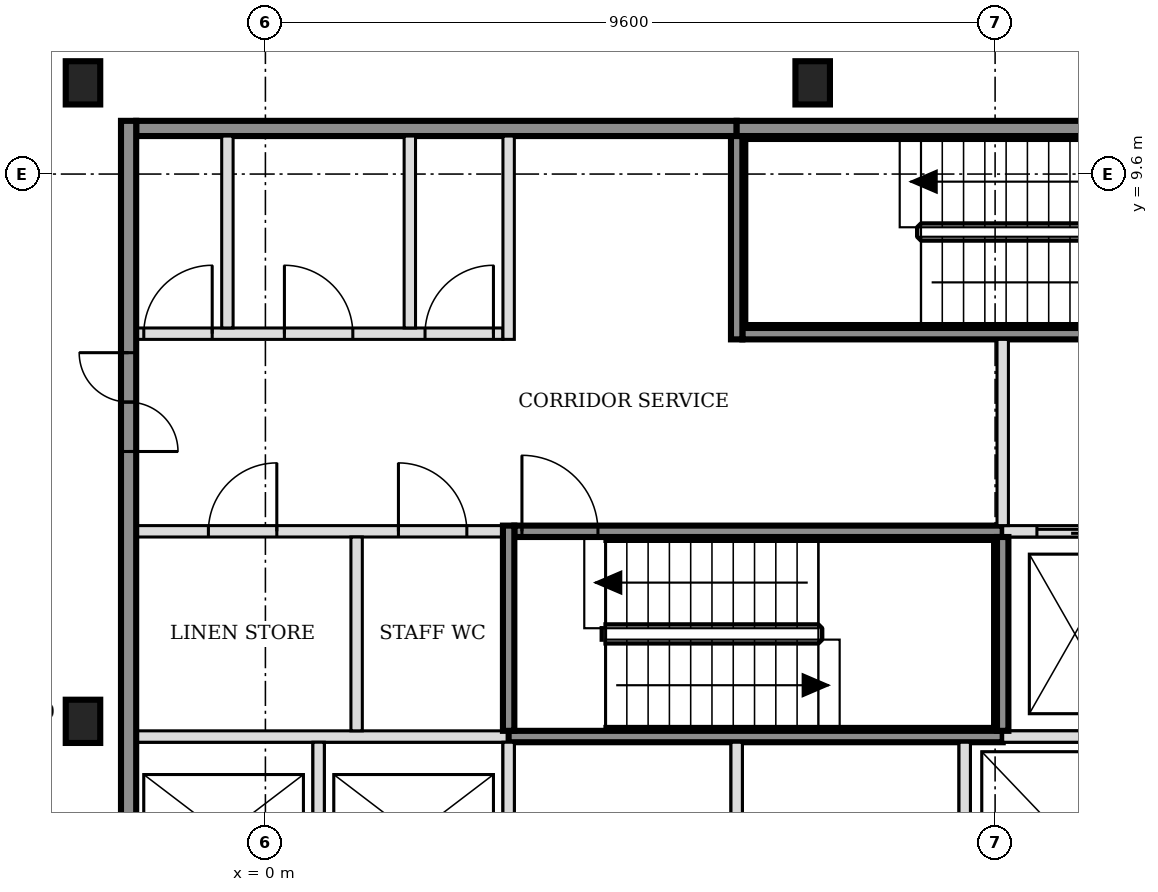
"""IFC4 building model, lengths in metres.
Left out: names, types, materials, properties, quantities, classifications, styles, units other than length and angle.
Written with IfcOpenShell. Run it as: python <this file> out.ifc"""

import sys

from ifc_helpers import new_model, si_unit, direction, frame, frame_2d, origin, origin_2d, place, context, subcontext, project, spatial, rectangle, i_section, extrude, element, fill, save


model = new_model("IFC4")
c1 = context("Model", 3, precision=1e-05, world=origin(), true_north=direction((0.0, 1.0)))
c2 = subcontext(c1, "Body", "Model", "MODEL_VIEW")
j1 = project(units=[si_unit("LENGTHUNIT", "METRE"), si_unit("PLANEANGLEUNIT", "RADIAN")], contexts=[c1])
p1 = place(None, origin())
s1 = spatial("IfcSite", under=j1, at=p1, CompositionType="ELEMENT")
p2 = place(p1, origin())
s2 = spatial("IfcBuilding", under=s1, at=p2, CompositionType="ELEMENT")
p3 = place(p2, frame((0.0, 0.0, 51.0)))
s3 = spatial("IfcBuildingStorey", under=s2, at=p3, CompositionType="ELEMENT", Elevation=51.0)
for number, where, z_axis, x_axis in (
    (1, (-2.4, 2.4, -0.15), (0.0, 0.0, 1.0), (1.0, 0.0, 0.0)),
    (2, (-2.4, 10.8, -0.15), (0.0, 0.0, 1.0), (1.0, 0.0, 0.0)),
    (3, (7.2, 10.8, -0.15), (0.0, 0.0, 1.0), (1.0, 0.0, 0.0)),
):
    element("IfcColumn", number, at=place(p3, frame(where, z_axis=z_axis, x_axis=x_axis)), inside=s3, PredefinedType="COLUMN", context=c2, shape_type="SweptSolid", body=[
        extrude(i_section(OverallWidth=0.454, OverallDepth=0.569, WebThickness=0.078, FlangeThickness=0.125, FilletRadius=0.015, at=origin_2d()), origin(), (0.0, 0.0, 1.0), 3.6),
    ])
p4 = place(p3, frame((-1.7, 2.2, 0.0), z_axis=(0.0, 0.0, 1.0), x_axis=(1.0, 0.0, 0.0)))
e4 = element("IfcWall", 4, at=p4, inside=s3, PredefinedType="SOLIDWALL", context=c2, shape_type="SweptSolid", body=[
    extrude(rectangle(XDim=4.9, YDim=0.15, at=frame_2d((2.45, 0.0))), origin(), (0.0, 0.0, 1.0), 3.45),
])
p5 = place(p3, frame((3.2, 2.2, 0.0), z_axis=(0.0, 0.0, 1.0), x_axis=(1.0, 0.0, 0.0)))
e5 = element("IfcWall", 5, at=p5, inside=s3, PredefinedType="SOLIDWALL", context=c2, shape_type="SweptSolid", body=[
    extrude(rectangle(XDim=6.5, YDim=0.15, at=frame_2d((3.25, 0.0))), origin(), (0.0, 0.0, 1.0), 3.45),
])
p6 = place(p3, frame((9.7, 2.2, 0.0), z_axis=(0.0, 0.0, 1.0), x_axis=(1.0, 0.0, 0.0)))
e6 = element("IfcWall", 6, at=p6, inside=s3, PredefinedType="SOLIDWALL", context=c2, shape_type="SweptSolid", body=[
    extrude(rectangle(XDim=4.525, YDim=0.15, at=frame_2d((2.263, 0.0))), origin(), (0.0, 0.0, 1.0), 3.45),
])
p7 = place(p3, frame((-1.7, 4.9, 0.0), z_axis=(0.0, 0.0, 1.0), x_axis=(1.0, 0.0, 0.0)))
e7 = element("IfcWall", 7, at=p7, inside=s3, PredefinedType="PARTITIONING", context=c2, shape_type="SweptSolid", body=[
    extrude(rectangle(XDim=4.825, YDim=0.15, at=frame_2d((2.413, 0.0))), origin(), (0.0, 0.0, 1.0), 3.45),
])
p8 = place(p7, frame((0.95, 0.0, 0.0)))
e8 = element("IfcOpeningElement", 8, at=p8, cuts=e7, PredefinedType="OPENING", context=c2, shape_type="SweptSolid", body=[
    extrude(rectangle(XDim=0.9, YDim=2.1, at=frame_2d((0.45, 1.05))), frame((0.0, 0.085, 0.0), z_axis=(0.0, -1.0, 0.0), x_axis=(1.0, 0.0, 0.0)), (0.0, 0.0, 1.0), 0.17),
])
p9 = place(p7, frame((3.45, 0.0, 0.0)))
e9 = element("IfcOpeningElement", 9, at=p9, cuts=e7, PredefinedType="OPENING", context=c2, shape_type="SweptSolid", body=[
    extrude(rectangle(XDim=0.9, YDim=2.1, at=frame_2d((0.45, 1.05))), frame((0.0, 0.085, 0.0), z_axis=(0.0, -1.0, 0.0), x_axis=(1.0, 0.0, 0.0)), (0.0, 0.0, 1.0), 0.17),
])
p10 = place(p3, frame((3.275, 4.9, 0.0), z_axis=(0.0, 0.0, 1.0), x_axis=(1.0, 0.0, 0.0)))
e10 = element("IfcWall", 10, at=p10, inside=s3, PredefinedType="SOLIDWALL", context=c2, shape_type="SweptSolid", body=[
    extrude(rectangle(XDim=6.425, YDim=0.15, at=frame_2d((3.212, 0.0))), origin(), (0.0, 0.0, 1.0), 3.45),
])
p11 = place(p10, frame((0.1, 0.0, 0.0)))
e11 = element("IfcOpeningElement", 11, at=p11, cuts=e10, PredefinedType="OPENING", context=c2, shape_type="SweptSolid", body=[
    extrude(rectangle(XDim=1.0, YDim=2.1, at=frame_2d((0.5, 1.05))), frame((0.0, 0.085, 0.0), z_axis=(0.0, -1.0, 0.0), x_axis=(1.0, 0.0, 0.0)), (0.0, 0.0, 1.0), 0.17),
])
p12 = place(p3, frame((9.7, 4.9, 0.0), z_axis=(0.0, 0.0, 1.0), x_axis=(1.0, 0.0, 0.0)))
e12 = element("IfcWall", 12, at=p12, inside=s3, PredefinedType="SOLIDWALL", context=c2, shape_type="SweptSolid", body=[
    extrude(rectangle(XDim=6.4, YDim=0.15, at=frame_2d((3.2, 0.0))), origin(), (0.0, 0.0, 1.0), 3.45),
])
p13 = place(p12, frame((0.45, 0.0, 0.0)))
e13 = element("IfcOpeningElement", 13, at=p13, cuts=e12, PredefinedType="OPENING", context=c2, shape_type="SweptSolid", body=[
    extrude(rectangle(XDim=1.0, YDim=2.1, at=frame_2d((0.5, 1.05))), frame((0.0, 0.085, 0.0), z_axis=(0.0, -1.0, 0.0), x_axis=(1.0, 0.0, 0.0)), (0.0, 0.0, 1.0), 0.17),
])
p14 = place(p12, frame((2.35, 0.0, 0.0)))
e14 = element("IfcOpeningElement", 14, at=p14, cuts=e12, PredefinedType="OPENING", context=c2, shape_type="SweptSolid", body=[
    extrude(rectangle(XDim=1.0, YDim=2.1, at=frame_2d((0.5, 1.05))), frame((0.0, 0.085, 0.0), z_axis=(0.0, -1.0, 0.0), x_axis=(1.0, 0.0, 0.0)), (0.0, 0.0, 1.0), 0.17),
])
p15 = place(p12, frame((4.7, 0.0, 0.0)))
e15 = element("IfcOpeningElement", 15, at=p15, cuts=e12, PredefinedType="OPENING", context=c2, shape_type="SweptSolid", body=[
    extrude(rectangle(XDim=0.9, YDim=2.1, at=frame_2d((0.45, 1.05))), frame((0.0, 0.085, 0.0), z_axis=(0.0, -1.0, 0.0), x_axis=(1.0, 0.0, 0.0)), (0.0, 0.0, 1.0), 0.17),
])
p16 = place(p3, frame((-1.7, 7.5, 0.0), z_axis=(0.0, 0.0, 1.0), x_axis=(1.0, 0.0, 0.0)))
e16 = element("IfcWall", 16, at=p16, inside=s3, PredefinedType="PARTITIONING", context=c2, shape_type="SweptSolid", body=[
    extrude(rectangle(XDim=4.825, YDim=0.15, at=frame_2d((2.413, 0.0))), origin(), (0.0, 0.0, 1.0), 3.45),
])
p17 = place(p16, frame((0.1, 0.0, 0.0)))
e17 = element("IfcOpeningElement", 17, at=p17, cuts=e16, PredefinedType="OPENING", context=c2, shape_type="SweptSolid", body=[
    extrude(rectangle(XDim=0.9, YDim=2.1, at=frame_2d((0.45, 1.05))), frame((0.0, 0.085, 0.0), z_axis=(0.0, -1.0, 0.0), x_axis=(1.0, 0.0, 0.0)), (0.0, 0.0, 1.0), 0.17),
])
p18 = place(p16, frame((1.95, 0.0, 0.0)))
e18 = element("IfcOpeningElement", 18, at=p18, cuts=e16, PredefinedType="OPENING", context=c2, shape_type="SweptSolid", body=[
    extrude(rectangle(XDim=0.9, YDim=2.1, at=frame_2d((0.45, 1.05))), frame((0.0, 0.085, 0.0), z_axis=(0.0, -1.0, 0.0), x_axis=(1.0, 0.0, 0.0)), (0.0, 0.0, 1.0), 0.17),
])
p19 = place(p16, frame((3.8, 0.0, 0.0)))
e19 = element("IfcOpeningElement", 19, at=p19, cuts=e16, PredefinedType="OPENING", context=c2, shape_type="SweptSolid", body=[
    extrude(rectangle(XDim=0.9, YDim=2.1, at=frame_2d((0.45, 1.05))), frame((0.0, 0.085, 0.0), z_axis=(0.0, -1.0, 0.0), x_axis=(1.0, 0.0, 0.0)), (0.0, 0.0, 1.0), 0.17),
])
p20 = place(p3, frame((6.275, 7.5, 0.0), z_axis=(0.0, 0.0, 1.0), x_axis=(1.0, 0.0, 0.0)))
e20 = element("IfcWall", 20, at=p20, inside=s3, PredefinedType="SOLIDWALL", context=c2, shape_type="SweptSolid", body=[
    extrude(rectangle(XDim=6.425, YDim=0.15, at=frame_2d((3.212, 0.0))), origin(), (0.0, 0.0, 1.0), 3.45),
])
p21 = place(p20, frame((5.225, 0.0, 0.0)))
e21 = element("IfcOpeningElement", 21, at=p21, cuts=e20, PredefinedType="OPENING", context=c2, shape_type="SweptSolid", body=[
    extrude(rectangle(XDim=1.0, YDim=2.1, at=frame_2d((0.5, 1.05))), frame((0.0, 0.085, 0.0), z_axis=(0.0, -1.0, 0.0), x_axis=(1.0, 0.0, 0.0)), (0.0, 0.0, 1.0), 0.17),
])
p22 = place(p3, frame((-1.7, 10.2, 0.0), z_axis=(0.0, 0.0, 1.0), x_axis=(1.0, 0.0, 0.0)))
e22 = element("IfcWall", 22, at=p22, inside=s3, PredefinedType="SOLIDWALL", context=c2, shape_type="SweptSolid", body=[
    extrude(rectangle(XDim=7.9, YDim=0.2, at=frame_2d((3.95, 0.0))), origin(), (0.0, 0.0, 1.0), 3.45),
])
p23 = place(p3, frame((6.2, 10.2, 0.0), z_axis=(0.0, 0.0, 1.0), x_axis=(1.0, 0.0, 0.0)))
e23 = element("IfcWall", 23, at=p23, inside=s3, PredefinedType="SOLIDWALL", context=c2, shape_type="SweptSolid", body=[
    extrude(rectangle(XDim=6.5, YDim=0.2, at=frame_2d((3.25, 0.0))), origin(), (0.0, 0.0, 1.0), 3.45),
])
p24 = place(p3, frame((-1.8, -5.5, 0.0), z_axis=(0.0, 0.0, 1.0), x_axis=(0.0, 1.0, 0.0)))
e24 = element("IfcWall", 24, at=p24, inside=s3, PredefinedType="SOLIDWALL", context=c2, shape_type="SweptSolid", body=[
    extrude(rectangle(XDim=15.8, YDim=0.2, at=frame_2d((7.9, 0.0))), origin(), (0.0, 0.0, 1.0), 3.45),
])
p25 = place(p24, frame((3.05, 0.0, 0.0)))
e25 = element("IfcOpeningElement", 25, at=p25, cuts=e24, PredefinedType="OPENING", context=c2, shape_type="SweptSolid", body=[
    extrude(rectangle(XDim=1.3, YDim=2.1, at=frame_2d((0.65, 1.05))), frame((0.0, 0.11, 0.0), z_axis=(0.0, -1.0, 0.0), x_axis=(1.0, 0.0, 0.0)), (0.0, 0.0, 1.0), 0.22),
])
p26 = place(p24, frame((11.45, 0.0, 0.0)))
e26 = element("IfcOpeningElement", 26, at=p26, cuts=e24, PredefinedType="OPENING", context=c2, shape_type="SweptSolid", body=[
    extrude(rectangle(XDim=1.3, YDim=2.1, at=frame_2d((0.65, 1.05))), frame((0.0, 0.11, 0.0), z_axis=(0.0, -1.0, 0.0), x_axis=(1.0, 0.0, 0.0)), (0.0, 0.0, 1.0), 0.22),
])
p27 = place(p3, frame((-0.5, 7.575, 0.0), z_axis=(0.0, 0.0, 1.0), x_axis=(0.0, 1.0, 0.0)))
e27 = element("IfcWall", 27, at=p27, inside=s3, PredefinedType="PARTITIONING", context=c2, shape_type="SweptSolid", body=[
    extrude(rectangle(XDim=2.525, YDim=0.15, at=frame_2d((1.263, 0.0))), origin(), (0.0, 0.0, 1.0), 3.45),
])
p28 = place(p3, frame((0.7, -0.325, 0.0), z_axis=(0.0, 0.0, 1.0), x_axis=(0.0, 1.0, 0.0)))
e28 = element("IfcWall", 28, at=p28, inside=s3, PredefinedType="SOLIDWALL", context=c2, shape_type="SweptSolid", body=[
    extrude(rectangle(XDim=2.45, YDim=0.15, at=frame_2d((1.225, 0.0))), origin(), (0.0, 0.0, 1.0), 3.45),
])
p29 = place(p3, frame((1.2, 2.275, 0.0), z_axis=(0.0, 0.0, 1.0), x_axis=(0.0, 1.0, 0.0)))
e29 = element("IfcWall", 29, at=p29, inside=s3, PredefinedType="PARTITIONING", context=c2, shape_type="SweptSolid", body=[
    extrude(rectangle(XDim=2.55, YDim=0.15, at=frame_2d((1.275, 0.0))), origin(), (0.0, 0.0, 1.0), 3.45),
])
p30 = place(p3, frame((1.9, 7.575, 0.0), z_axis=(0.0, 0.0, 1.0), x_axis=(0.0, 1.0, 0.0)))
e30 = element("IfcWall", 30, at=p30, inside=s3, PredefinedType="PARTITIONING", context=c2, shape_type="SweptSolid", body=[
    extrude(rectangle(XDim=2.525, YDim=0.15, at=frame_2d((1.263, 0.0))), origin(), (0.0, 0.0, 1.0), 3.45),
])
p31 = place(p3, frame((3.2, -0.325, 0.0), z_axis=(0.0, 0.0, 1.0), x_axis=(0.0, 1.0, 0.0)))
e31 = element("IfcWall", 31, at=p31, inside=s3, PredefinedType="SOLIDWALL", context=c2, shape_type="SweptSolid", body=[
    extrude(rectangle(XDim=2.45, YDim=0.15, at=frame_2d((1.225, 0.0))), origin(), (0.0, 0.0, 1.0), 3.45),
])
p32 = place(p3, frame((3.2, 2.275, 0.0), z_axis=(0.0, 0.0, 1.0), x_axis=(0.0, 1.0, 0.0)))
e32 = element("IfcWall", 32, at=p32, inside=s3, PredefinedType="SOLIDWALL", context=c2, shape_type="SweptSolid", body=[
    extrude(rectangle(XDim=2.7, YDim=0.15, at=frame_2d((1.35, 0.0))), origin(), (0.0, 0.0, 1.0), 3.45),
])
p33 = place(p3, frame((3.2, 7.425, 0.0), z_axis=(0.0, 0.0, 1.0), x_axis=(0.0, 1.0, 0.0)))
e33 = element("IfcWall", 33, at=p33, inside=s3, PredefinedType="PARTITIONING", context=c2, shape_type="SweptSolid", body=[
    extrude(rectangle(XDim=2.675, YDim=0.15, at=frame_2d((1.337, 0.0))), origin(), (0.0, 0.0, 1.0), 3.45),
])
p34 = place(p3, frame((6.2, -0.325, 0.0), z_axis=(0.0, 0.0, 1.0), x_axis=(0.0, 1.0, 0.0)))
e34 = element("IfcWall", 34, at=p34, inside=s3, PredefinedType="SOLIDWALL", context=c2, shape_type="SweptSolid", body=[
    extrude(rectangle(XDim=2.45, YDim=0.15, at=frame_2d((1.225, 0.0))), origin(), (0.0, 0.0, 1.0), 3.45),
])
p35 = place(p3, frame((6.2, 7.425, 0.0), z_axis=(0.0, 0.0, 1.0), x_axis=(0.0, 1.0, 0.0)))
e35 = element("IfcWall", 35, at=p35, inside=s3, PredefinedType="SOLIDWALL", context=c2, shape_type="SweptSolid", body=[
    extrude(rectangle(XDim=2.675, YDim=0.15, at=frame_2d((1.337, 0.0))), origin(), (0.0, 0.0, 1.0), 3.45),
])
p36 = place(p3, frame((9.2, -0.325, 0.0), z_axis=(0.0, 0.0, 1.0), x_axis=(0.0, 1.0, 0.0)))
e36 = element("IfcWall", 36, at=p36, inside=s3, PredefinedType="SOLIDWALL", context=c2, shape_type="SweptSolid", body=[
    extrude(rectangle(XDim=2.45, YDim=0.15, at=frame_2d((1.225, 0.0))), origin(), (0.0, 0.0, 1.0), 3.45),
])
p37 = place(p3, frame((9.7, 2.275, 0.0), z_axis=(0.0, 0.0, 1.0), x_axis=(0.0, 1.0, 0.0)))
e37 = element("IfcWall", 37, at=p37, inside=s3, PredefinedType="SOLIDWALL", context=c2, shape_type="SweptSolid", body=[
    extrude(rectangle(XDim=2.55, YDim=0.15, at=frame_2d((1.275, 0.0))), origin(), (0.0, 0.0, 1.0), 3.45),
])
p38 = place(p3, frame((9.7, 4.975, 0.0), z_axis=(0.0, 0.0, 1.0), x_axis=(0.0, 1.0, 0.0)))
e38 = element("IfcWall", 38, at=p38, inside=s3, PredefinedType="SOLIDWALL", context=c2, shape_type="SweptSolid", body=[
    extrude(rectangle(XDim=2.45, YDim=0.15, at=frame_2d((1.225, 0.0))), origin(), (0.0, 0.0, 1.0), 3.45),
])
p39 = place(p13, origin())
e39 = element("IfcDoor", 39, at=p39, inside=s3, OperationType="DOUBLE_DOOR_SLIDING", PredefinedType="DOOR", context=c2, shape_type="SweptSolid", body=[
    extrude(rectangle(XDim=1.0, YDim=2.1, at=frame_2d((0.5, 1.05))), frame((0.0, 0.025, 0.0), z_axis=(0.0, -1.0, 0.0), x_axis=(1.0, 0.0, 0.0)), (0.0, 0.0, 1.0), 0.05),
])
fill(e13, e39)
p40 = place(p11, origin())
e40 = element("IfcDoor", 40, at=p40, inside=s3, OperationType="SINGLE_SWING_LEFT", PredefinedType="DOOR", context=c2, shape_type="SweptSolid", body=[
    extrude(rectangle(XDim=1.0, YDim=2.1, at=frame_2d((0.5, 1.05))), frame((0.0, 0.025, 0.0), z_axis=(0.0, -1.0, 0.0), x_axis=(1.0, 0.0, 0.0)), (0.0, 0.0, 1.0), 0.05),
])
fill(e11, e40)
p41 = place(p26, origin())
e41 = element("IfcDoor", 41, at=p41, inside=s3, OperationType="DOUBLE_DOOR_SINGLE_SWING", PredefinedType="DOOR", context=c2, shape_type="SweptSolid", body=[
    extrude(rectangle(XDim=1.3, YDim=2.1, at=frame_2d((0.65, 1.05))), frame((0.0, 0.025, 0.0), z_axis=(0.0, -1.0, 0.0), x_axis=(1.0, 0.0, 0.0)), (0.0, 0.0, 1.0), 0.05),
])
fill(e26, e41)
p42 = place(p8, origin())
e42 = element("IfcDoor", 42, at=p42, inside=s3, OperationType="SINGLE_SWING_RIGHT", PredefinedType="DOOR", context=c2, shape_type="SweptSolid", body=[
    extrude(rectangle(XDim=0.9, YDim=2.1, at=frame_2d((0.45, 1.05))), frame((0.0, 0.025, 0.0), z_axis=(0.0, -1.0, 0.0), x_axis=(1.0, 0.0, 0.0)), (0.0, 0.0, 1.0), 0.05),
])
fill(e8, e42)
p43 = place(p9, origin())
e43 = element("IfcDoor", 43, at=p43, inside=s3, OperationType="SINGLE_SWING_LEFT", PredefinedType="DOOR", context=c2, shape_type="SweptSolid", body=[
    extrude(rectangle(XDim=0.9, YDim=2.1, at=frame_2d((0.45, 1.05))), frame((0.0, 0.025, 0.0), z_axis=(0.0, -1.0, 0.0), x_axis=(1.0, 0.0, 0.0)), (0.0, 0.0, 1.0), 0.05),
])
fill(e9, e43)
p44 = place(p17, origin())
e44 = element("IfcDoor", 44, at=p44, inside=s3, OperationType="SINGLE_SWING_RIGHT", PredefinedType="DOOR", context=c2, shape_type="SweptSolid", body=[
    extrude(rectangle(XDim=0.9, YDim=2.1, at=frame_2d((0.45, 1.05))), frame((0.0, 0.025, 0.0), z_axis=(0.0, -1.0, 0.0), x_axis=(1.0, 0.0, 0.0)), (0.0, 0.0, 1.0), 0.05),
])
fill(e17, e44)
p45 = place(p18, origin())
e45 = element("IfcDoor", 45, at=p45, inside=s3, OperationType="SINGLE_SWING_LEFT", PredefinedType="DOOR", context=c2, shape_type="SweptSolid", body=[
    extrude(rectangle(XDim=0.9, YDim=2.1, at=frame_2d((0.45, 1.05))), frame((0.0, 0.025, 0.0), z_axis=(0.0, -1.0, 0.0), x_axis=(1.0, 0.0, 0.0)), (0.0, 0.0, 1.0), 0.05),
])
fill(e18, e45)
p46 = place(p19, origin())
e46 = element("IfcDoor", 46, at=p46, inside=s3, OperationType="SINGLE_SWING_RIGHT", PredefinedType="DOOR", context=c2, shape_type="SweptSolid", body=[
    extrude(rectangle(XDim=0.9, YDim=2.1, at=frame_2d((0.45, 1.05))), frame((0.0, 0.025, 0.0), z_axis=(0.0, -1.0, 0.0), x_axis=(1.0, 0.0, 0.0)), (0.0, 0.0, 1.0), 0.05),
])
fill(e19, e46)
save(model, sys.argv[1])
